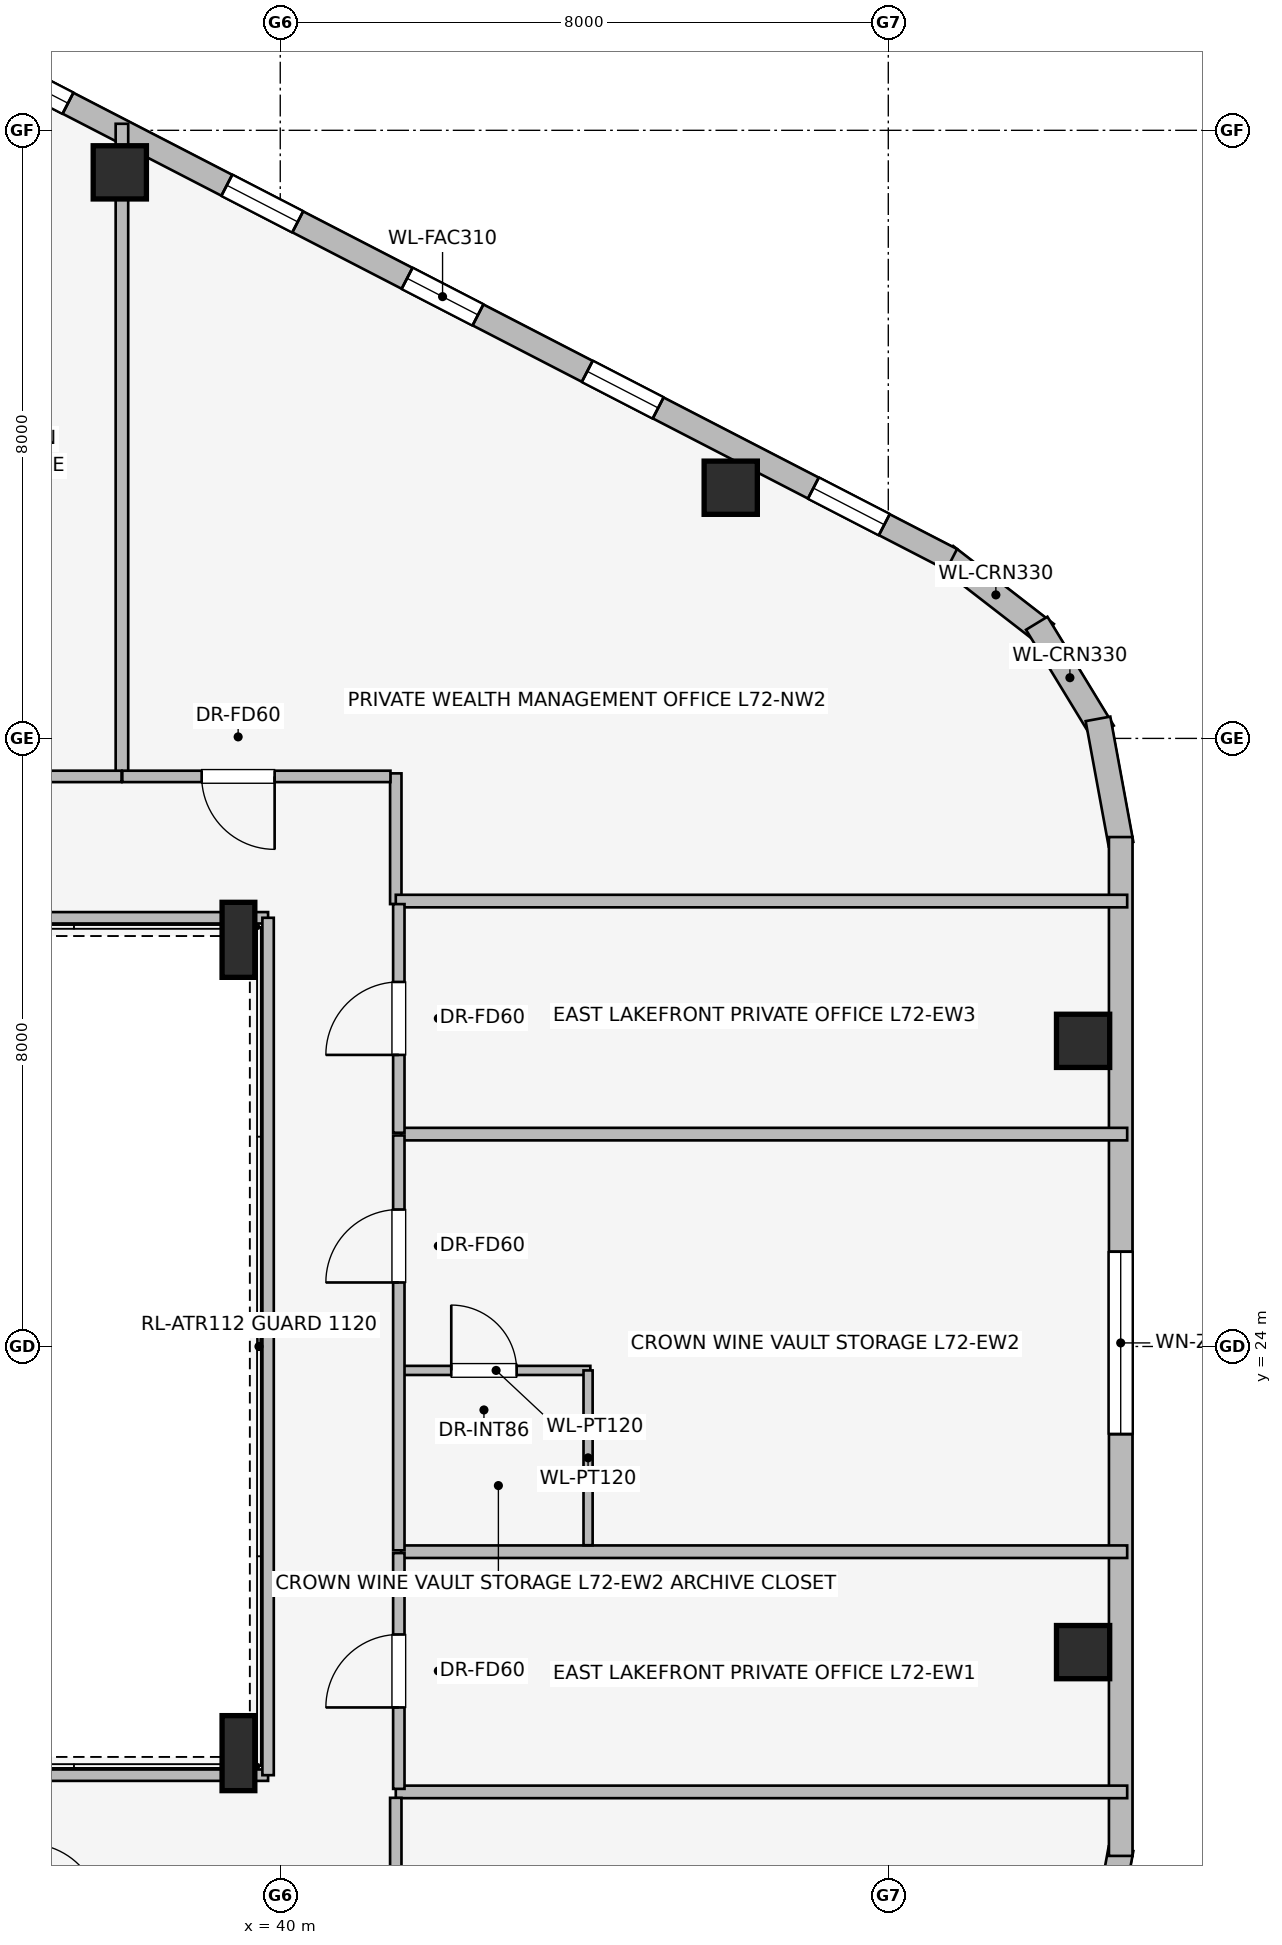
"""IFC4 building model, lengths in metres.
Left out: names, types, materials, properties, quantities, classifications, styles, units other than length and angle.
Written with IfcOpenShell. Run it as: python <this file> out.ifc"""

import sys

from ifc_helpers import new_model, si_unit, direction, frame, frame_2d, origin, origin_2d, place, context, subcontext, project, spatial, rectangle, i_section, extrude, element, fill, save


model = new_model("IFC4")
c1 = context("Model", 3, precision=1e-05, world=origin(), true_north=direction((0.0, 1.0)))
c2 = subcontext(c1, "Body", "Model", "MODEL_VIEW")
j1 = project(units=[si_unit("LENGTHUNIT", "METRE"), si_unit("PLANEANGLEUNIT", "RADIAN")], contexts=[c1])
p1 = place(None, origin())
s1 = spatial("IfcSite", under=j1, at=p1, CompositionType="ELEMENT")
p2 = place(p1, origin())
s2 = spatial("IfcBuilding", under=s1, at=p2, CompositionType="ELEMENT")
p3 = place(p2, frame((0.0, 0.0, 263.2)))
s3 = spatial("IfcBuildingStorey", under=s2, at=p3, CompositionType="ELEMENT", Elevation=263.2)
for number, where, z_axis, x_axis in (
    (1, (45.927, 35.298, 0.0), (0.0, 0.0, 1.0), (1.0, 0.0, 0.0)),
    (2, (37.889, 39.447, 0.0), (0.0, 0.0, 1.0), (1.0, 0.0, 0.0)),
    (3, (50.563, 19.979, 0.0), (0.0, 0.0, 1.0), (1.0, 0.0, 0.0)),
    (4, (50.563, 28.021, 0.0), (0.0, 0.0, 1.0), (1.0, 0.0, 0.0)),
):
    element("IfcColumn", number, at=place(p3, frame(where, z_axis=z_axis, x_axis=x_axis)), inside=s3, PredefinedType="COLUMN", context=c2, shape_type="SweptSolid", body=[
        extrude(rectangle(XDim=0.7, YDim=0.7, at=origin_2d()), origin(), (0.0, 0.0, 1.0), 3.55),
    ])
for number, where, z_axis, x_axis in (
    (5, (39.45, 18.65, 0.0), (0.0, 0.0, 1.0), (1.0, 0.0, 0.0)),
    (6, (39.45, 29.35, 0.0), (0.0, 0.0, 1.0), (1.0, 0.0, 0.0)),
):
    element("IfcColumn", number, at=place(p3, frame(where, z_axis=z_axis, x_axis=x_axis)), inside=s3, PredefinedType="COLUMN", context=c2, shape_type="SweptSolid", body=[
        extrude(i_section(OverallWidth=0.431, OverallDepth=0.987, WebThickness=0.034, FlangeThickness=0.062, at=origin_2d()), origin(), (0.0, 0.0, 1.0), 3.55),
    ])
p4 = place(p3, frame((48.753, 34.401, 0.0), z_axis=(0.0, 0.0, 1.0), x_axis=(0.790691856293, -0.61221433207, 0.0)))
e7 = element("IfcWall", 7, at=p4, inside=s3, PredefinedType="STANDARD", context=c2, shape_type="SweptSolid", body=[
    extrude(rectangle(XDim=1.676, YDim=0.33, at=frame_2d((0.838, 0.0))), origin(), (0.0, 0.0, 1.0), 3.29),
])
p5 = place(p3, frame((49.953, 33.515, 0.0), z_axis=(0.0, 0.0, 1.0), x_axis=(0.520325409202, -0.853968072318, 0.0)))
e8 = element("IfcWall", 8, at=p5, inside=s3, PredefinedType="STANDARD", context=c2, shape_type="SweptSolid", body=[
    extrude(rectangle(XDim=1.678, YDim=0.33, at=frame_2d((0.839, 0.0))), origin(), (0.0, 0.0, 1.0), 3.29),
])
p6 = place(p3, frame((50.759, 32.257, 0.0), z_axis=(0.0, 0.0, 1.0), x_axis=(0.180691763044, -0.983539773862, 0.0)))
e9 = element("IfcWall", 9, at=p6, inside=s3, PredefinedType="STANDARD", context=c2, shape_type="SweptSolid", body=[
    extrude(rectangle(XDim=1.677, YDim=0.33, at=frame_2d((0.838, 0.0))), origin(), (0.0, 0.0, 1.0), 3.29),
])
p7 = place(p3, frame((35.437, 41.27, 0.0), z_axis=(0.0, 0.0, 1.0), x_axis=(0.888581481622, -0.458718814218, 0.0)))
e10 = element("IfcWall", 10, at=p7, inside=s3, PredefinedType="STANDARD", context=c2, shape_type="SweptSolid", body=[
    extrude(rectangle(XDim=15.077, YDim=0.31, at=frame_2d((7.539, 0.0))), origin(), (0.0, 0.0, 1.0), 3.29),
])
p8 = place(p7, frame((0.942, 0.0, 0.75)))
e11 = element("IfcOpeningElement", 11, at=p8, cuts=e10, PredefinedType="OPENING", context=c2, shape_type="SweptSolid", body=[
    extrude(rectangle(XDim=1.05, YDim=1.4, at=frame_2d((0.525, 0.7))), frame((0.0, 0.165, 0.0), z_axis=(0.0, -1.0, 0.0), x_axis=(1.0, 0.0, 0.0)), (0.0, 0.0, 1.0), 0.33),
])
p9 = place(p7, frame((4.344, 0.0, 0.75)))
e12 = element("IfcOpeningElement", 12, at=p9, cuts=e10, PredefinedType="OPENING", context=c2, shape_type="SweptSolid", body=[
    extrude(rectangle(XDim=1.05, YDim=1.4, at=frame_2d((0.525, 0.7))), frame((0.0, 0.165, 0.0), z_axis=(0.0, -1.0, 0.0), x_axis=(1.0, 0.0, 0.0)), (0.0, 0.0, 1.0), 0.33),
])
p10 = place(p7, frame((7.013, 0.0, 0.75)))
e13 = element("IfcOpeningElement", 13, at=p10, cuts=e10, PredefinedType="OPENING", context=c2, shape_type="SweptSolid", body=[
    extrude(rectangle(XDim=1.05, YDim=1.4, at=frame_2d((0.525, 0.7))), frame((0.0, 0.165, 0.0), z_axis=(0.0, -1.0, 0.0), x_axis=(1.0, 0.0, 0.0)), (0.0, 0.0, 1.0), 0.33),
])
p11 = place(p7, frame((9.681, 0.0, 0.75)))
e14 = element("IfcOpeningElement", 14, at=p11, cuts=e10, PredefinedType="OPENING", context=c2, shape_type="SweptSolid", body=[
    extrude(rectangle(XDim=1.05, YDim=1.4, at=frame_2d((0.525, 0.7))), frame((0.0, 0.165, 0.0), z_axis=(0.0, -1.0, 0.0), x_axis=(1.0, 0.0, 0.0)), (0.0, 0.0, 1.0), 0.33),
])
p12 = place(p7, frame((13.029, 0.0, 0.75)))
e15 = element("IfcOpeningElement", 15, at=p12, cuts=e10, PredefinedType="OPENING", context=c2, shape_type="SweptSolid", body=[
    extrude(rectangle(XDim=1.05, YDim=1.4, at=frame_2d((0.525, 0.7))), frame((0.0, 0.165, 0.0), z_axis=(0.0, -1.0, 0.0), x_axis=(1.0, 0.0, 0.0)), (0.0, 0.0, 1.0), 0.33),
])
p13 = place(p3, frame((51.062, 17.392, 0.0), z_axis=(0.0, 0.0, 1.0), x_axis=(-0.180691763044, -0.983539773862, 0.0)))
e16 = element("IfcWall", 16, at=p13, inside=s3, PredefinedType="STANDARD", context=c2, shape_type="SweptSolid", body=[
    extrude(rectangle(XDim=1.677, YDim=0.33, at=frame_2d((0.838, 0.0))), origin(), (0.0, 0.0, 1.0), 3.29),
])
p14 = place(p3, frame((51.058, 30.702, 0.0), z_axis=(0.0, 0.0, 1.0), x_axis=(0.0, -1.0, 0.0)))
e17 = element("IfcWall", 17, at=p14, inside=s3, PredefinedType="STANDARD", context=c2, shape_type="SweptSolid", body=[
    extrude(rectangle(XDim=13.404, YDim=0.31, at=frame_2d((6.702, 0.0))), origin(), (0.0, 0.0, 1.0), 3.29),
])
p15 = place(p14, frame((5.455, 0.0, 0.75)))
e18 = element("IfcOpeningElement", 18, at=p15, cuts=e17, PredefinedType="OPENING", context=c2, shape_type="SweptSolid", body=[
    extrude(rectangle(XDim=2.4, YDim=1.6, at=frame_2d((1.2, 0.8))), frame((0.0, 0.165, 0.0), z_axis=(0.0, -1.0, 0.0), x_axis=(1.0, 0.0, 0.0)), (0.0, 0.0, 1.0), 0.33),
])
p16 = place(p3, frame((27.675, 18.36, 0.0), z_axis=(0.0, 0.0, 1.0), x_axis=(1.0, 0.0, 0.0)))
e19 = element("IfcWall", 19, at=p16, inside=s3, PredefinedType="PARTITIONING", context=c2, shape_type="SweptSolid", body=[
    extrude(rectangle(XDim=12.165, YDim=0.15, at=frame_2d((6.083, 0.0))), origin(), (0.0, 0.0, 1.0), 2.431),
])
p17 = place(p3, frame((39.84, 29.64, 0.0), z_axis=(0.0, 0.0, 1.0), x_axis=(-1.0, 0.0, 0.0)))
e20 = element("IfcWall", 20, at=p17, inside=s3, PredefinedType="PARTITIONING", context=c2, shape_type="SweptSolid", body=[
    extrude(rectangle(XDim=12.203, YDim=0.15, at=frame_2d((6.102, 0.0))), origin(), (0.0, 0.0, 1.0), 2.431),
])
p18 = place(p3, frame((39.84, 18.36, 0.0), z_axis=(0.0, 0.0, 1.0), x_axis=(0.0, 1.0, 0.0)))
e21 = element("IfcWall", 21, at=p18, inside=s3, PredefinedType="PARTITIONING", context=c2, shape_type="SweptSolid", body=[
    extrude(rectangle(XDim=11.28, YDim=0.15, at=frame_2d((5.64, 0.0))), origin(), (0.0, 0.0, 1.0), 3.29),
])
p19 = place(p3, frame((41.52, 29.82, 0.0), z_axis=(0.0, 0.0, 1.0), x_axis=(0.0, 1.0, 0.0)))
e22 = element("IfcWall", 22, at=p19, inside=s3, PredefinedType="PARTITIONING", context=c2, shape_type="SweptSolid", body=[
    extrude(rectangle(XDim=1.72, YDim=0.15, at=frame_2d((0.86, 0.0))), origin(), (0.0, 0.0, 1.0), 3.29),
])
p20 = place(p3, frame((37.917, 31.51, 0.0), z_axis=(0.0, 0.0, 1.0), x_axis=(0.0, 1.0, 0.0)))
e23 = element("IfcWall", 23, at=p20, inside=s3, PredefinedType="PARTITIONING", context=c2, shape_type="SweptSolid", body=[
    extrude(rectangle(XDim=8.576, YDim=0.165, at=frame_2d((4.288, 0.0))), origin(), (0.0, 0.0, 1.0), 2.679),
])
p21 = place(p3, frame((37.912, 31.5, 0.0), z_axis=(0.0, 0.0, 1.0), x_axis=(-1.0, 0.0, 0.0)))
e24 = element("IfcWall", 24, at=p21, inside=s3, PredefinedType="PARTITIONING", context=c2, shape_type="SweptSolid", body=[
    extrude(rectangle(XDim=3.622, YDim=0.15, at=frame_2d((1.811, 0.0))), origin(), (0.0, 0.0, 1.0), 3.29),
])
p22 = place(p21, frame((1.212, 0.0, 0.0)))
e25 = element("IfcOpeningElement", 25, at=p22, cuts=e24, PredefinedType="OPENING", context=c2, shape_type="SweptSolid", body=[
    extrude(rectangle(XDim=0.96, YDim=2.0, at=frame_2d((0.48, 1.0))), frame((0.0, 0.085, 0.0), z_axis=(0.0, -1.0, 0.0), x_axis=(1.0, 0.0, 0.0)), (0.0, 0.0, 1.0), 0.17),
])
p23 = place(p3, frame((41.45, 31.5, 0.0), z_axis=(0.0, 0.0, 1.0), x_axis=(-1.0, 0.0, 0.0)))
e26 = element("IfcWall", 26, at=p23, inside=s3, PredefinedType="PARTITIONING", context=c2, shape_type="SweptSolid", body=[
    extrude(rectangle(XDim=3.528, YDim=0.15, at=frame_2d((1.764, 0.0))), origin(), (0.0, 0.0, 1.0), 3.29),
])
p24 = place(p23, frame((1.524, 0.0, 0.0)))
e27 = element("IfcOpeningElement", 27, at=p24, cuts=e26, PredefinedType="OPENING", context=c2, shape_type="SweptSolid", body=[
    extrude(rectangle(XDim=0.96, YDim=2.0, at=frame_2d((0.48, 1.0))), frame((0.0, 0.085, 0.0), z_axis=(0.0, -1.0, 0.0), x_axis=(1.0, 0.0, 0.0)), (0.0, 0.0, 1.0), 0.17),
])
for number, where, z_axis, x_axis in (
    (28, (41.52, 18.14, 0.0), (0.0, 0.0, 1.0), (1.0, 0.0, 0.0)),
    (29, (41.52, 29.86, 0.0), (0.0, 0.0, 1.0), (1.0, 0.0, 0.0)),
):
    element("IfcWall", number, at=place(p3, frame(where, z_axis=z_axis, x_axis=x_axis)), inside=s3, PredefinedType="PARTITIONING", context=c2, shape_type="SweptSolid", body=[
        extrude(rectangle(XDim=9.623, YDim=0.165, at=frame_2d((4.812, 0.0))), origin(), (0.0, 0.0, 1.0), 3.29),
    ])
for number, where, z_axis, x_axis in (
    (30, (41.59, 21.3, 0.0), (0.0, 0.0, 1.0), (1.0, 0.0, 0.0)),
    (31, (41.59, 26.794, 0.0), (0.0, 0.0, 1.0), (1.0, 0.0, 0.0)),
):
    element("IfcWall", number, at=place(p3, frame(where, z_axis=z_axis, x_axis=x_axis)), inside=s3, PredefinedType="PARTITIONING", context=c2, shape_type="SweptSolid", body=[
        extrude(rectangle(XDim=9.553, YDim=0.165, at=frame_2d((4.776, 0.0))), origin(), (0.0, 0.0, 1.0), 3.29),
    ])
p25 = place(p3, frame((41.56, 18.18, 0.0), z_axis=(0.0, 0.0, 1.0), x_axis=(0.0, 1.0, 0.0)))
e32 = element("IfcWall", 32, at=p25, inside=s3, PredefinedType="PARTITIONING", context=c2, shape_type="SweptSolid", body=[
    extrude(rectangle(XDim=3.102, YDim=0.15, at=frame_2d((1.551, 0.0))), origin(), (0.0, 0.0, 1.0), 3.29),
])
p26 = place(p25, frame((1.071, 0.0, 0.0)))
e33 = element("IfcOpeningElement", 33, at=p26, cuts=e32, PredefinedType="OPENING", context=c2, shape_type="SweptSolid", body=[
    extrude(rectangle(XDim=0.96, YDim=2.0, at=frame_2d((0.48, 1.0))), frame((0.0, 0.085, 0.0), z_axis=(0.0, -1.0, 0.0), x_axis=(1.0, 0.0, 0.0)), (0.0, 0.0, 1.0), 0.17),
])
p27 = place(p3, frame((41.6, 23.685, 0.0), z_axis=(0.0, 0.0, 1.0), x_axis=(1.0, 0.0, 0.0)))
e34 = element("IfcWall", 34, at=p27, inside=s3, PredefinedType="PARTITIONING", context=c2, shape_type="SweptSolid", body=[
    extrude(rectangle(XDim=2.48, YDim=0.12, at=frame_2d((1.24, 0.0))), origin(), (0.0, 0.0, 1.0), 3.29),
])
p28 = place(p27, frame((0.65, 0.0, 0.0)))
e35 = element("IfcOpeningElement", 35, at=p28, cuts=e34, PredefinedType="OPENING", context=c2, shape_type="SweptSolid", body=[
    extrude(rectangle(XDim=0.86, YDim=2.0, at=frame_2d((0.43, 1.0))), frame((0.0, 0.07, 0.0), z_axis=(0.0, -1.0, 0.0), x_axis=(1.0, 0.0, 0.0)), (0.0, 0.0, 1.0), 0.14),
])
p29 = place(p3, frame((44.05, 21.385, 0.0), z_axis=(0.0, 0.0, 1.0), x_axis=(0.0, 1.0, 0.0)))
e36 = element("IfcWall", 36, at=p29, inside=s3, PredefinedType="PARTITIONING", context=c2, shape_type="SweptSolid", body=[
    extrude(rectangle(XDim=2.3, YDim=0.12, at=frame_2d((1.15, 0.0))), origin(), (0.0, 0.0, 1.0), 2.887),
])
p30 = place(p3, frame((41.56, 21.318, 0.0), z_axis=(0.0, 0.0, 1.0), x_axis=(0.0, 1.0, 0.0)))
e37 = element("IfcWall", 37, at=p30, inside=s3, PredefinedType="PARTITIONING", context=c2, shape_type="SweptSolid", body=[
    extrude(rectangle(XDim=5.458, YDim=0.15, at=frame_2d((2.729, 0.0))), origin(), (0.0, 0.0, 1.0), 3.29),
])
p31 = place(p30, frame((3.524, 0.0, 0.0)))
e38 = element("IfcOpeningElement", 38, at=p31, cuts=e37, PredefinedType="OPENING", context=c2, shape_type="SweptSolid", body=[
    extrude(rectangle(XDim=0.96, YDim=2.0, at=frame_2d((0.48, 1.0))), frame((0.0, 0.085, 0.0), z_axis=(0.0, -1.0, 0.0), x_axis=(1.0, 0.0, 0.0)), (0.0, 0.0, 1.0), 0.17),
])
p32 = place(p3, frame((41.56, 26.812, 0.0), z_axis=(0.0, 0.0, 1.0), x_axis=(0.0, 1.0, 0.0)))
e39 = element("IfcWall", 39, at=p32, inside=s3, PredefinedType="PARTITIONING", context=c2, shape_type="SweptSolid", body=[
    extrude(rectangle(XDim=3.008, YDim=0.15, at=frame_2d((1.504, 0.0))), origin(), (0.0, 0.0, 1.0), 3.29),
])
p33 = place(p32, frame((1.024, 0.0, 0.0)))
e40 = element("IfcOpeningElement", 40, at=p33, cuts=e39, PredefinedType="OPENING", context=c2, shape_type="SweptSolid", body=[
    extrude(rectangle(XDim=0.96, YDim=2.0, at=frame_2d((0.48, 1.0))), frame((0.0, 0.085, 0.0), z_axis=(0.0, -1.0, 0.0), x_axis=(1.0, 0.0, 0.0)), (0.0, 0.0, 1.0), 0.17),
])
p34 = place(p3, frame((41.52, 16.46, 0.0), z_axis=(0.0, 0.0, 1.0), x_axis=(0.0, 1.0, 0.0)))
e41 = element("IfcWall", 41, at=p34, inside=s3, PredefinedType="PARTITIONING", context=c2, shape_type="SweptSolid", body=[
    extrude(rectangle(XDim=1.602, YDim=0.15, at=frame_2d((0.801, 0.0))), origin(), (0.0, 0.0, 1.0), 3.29),
])
p35 = place(p8, origin())
e42 = element("IfcWindow", 42, at=p35, inside=s3, PartitioningType="SINGLE_PANEL", PredefinedType="WINDOW", context=c2, shape_type="SweptSolid", body=[
    extrude(rectangle(XDim=1.05, YDim=1.4, at=frame_2d((0.525, 0.7))), frame((0.0, 0.03, 0.0), z_axis=(0.0, -1.0, 0.0), x_axis=(1.0, 0.0, 0.0)), (0.0, 0.0, 1.0), 0.06),
])
fill(e11, e42)
p36 = place(p9, origin())
e43 = element("IfcWindow", 43, at=p36, inside=s3, PartitioningType="SINGLE_PANEL", PredefinedType="WINDOW", context=c2, shape_type="SweptSolid", body=[
    extrude(rectangle(XDim=1.05, YDim=1.4, at=frame_2d((0.525, 0.7))), frame((0.0, 0.03, 0.0), z_axis=(0.0, -1.0, 0.0), x_axis=(1.0, 0.0, 0.0)), (0.0, 0.0, 1.0), 0.06),
])
fill(e12, e43)
p37 = place(p10, origin())
e44 = element("IfcWindow", 44, at=p37, inside=s3, PartitioningType="SINGLE_PANEL", PredefinedType="WINDOW", context=c2, shape_type="SweptSolid", body=[
    extrude(rectangle(XDim=1.05, YDim=1.4, at=frame_2d((0.525, 0.7))), frame((0.0, 0.03, 0.0), z_axis=(0.0, -1.0, 0.0), x_axis=(1.0, 0.0, 0.0)), (0.0, 0.0, 1.0), 0.06),
])
fill(e13, e44)
p38 = place(p11, origin())
e45 = element("IfcWindow", 45, at=p38, inside=s3, PartitioningType="SINGLE_PANEL", PredefinedType="WINDOW", context=c2, shape_type="SweptSolid", body=[
    extrude(rectangle(XDim=1.05, YDim=1.4, at=frame_2d((0.525, 0.7))), frame((0.0, 0.03, 0.0), z_axis=(0.0, -1.0, 0.0), x_axis=(1.0, 0.0, 0.0)), (0.0, 0.0, 1.0), 0.06),
])
fill(e14, e45)
p39 = place(p12, origin())
e46 = element("IfcWindow", 46, at=p39, inside=s3, PartitioningType="SINGLE_PANEL", PredefinedType="WINDOW", context=c2, shape_type="SweptSolid", body=[
    extrude(rectangle(XDim=1.05, YDim=1.4, at=frame_2d((0.525, 0.7))), frame((0.0, 0.03, 0.0), z_axis=(0.0, -1.0, 0.0), x_axis=(1.0, 0.0, 0.0)), (0.0, 0.0, 1.0), 0.06),
])
fill(e15, e46)
p40 = place(p15, origin())
e47 = element("IfcWindow", 47, at=p40, inside=s3, PartitioningType="SINGLE_PANEL", PredefinedType="WINDOW", context=c2, shape_type="SweptSolid", body=[
    extrude(rectangle(XDim=2.4, YDim=1.6, at=frame_2d((1.2, 0.8))), frame((0.0, 0.03, 0.0), z_axis=(0.0, -1.0, 0.0), x_axis=(1.0, 0.0, 0.0)), (0.0, 0.0, 1.0), 0.06),
])
fill(e18, e47)
p41 = place(p24, origin())
e48 = element("IfcDoor", 48, at=p41, inside=s3, OperationType="SINGLE_SWING_LEFT", PredefinedType="DOOR", context=c2, shape_type="SweptSolid", body=[
    extrude(rectangle(XDim=0.96, YDim=2.0, at=frame_2d((0.48, 1.0))), frame((0.0, 0.025, 0.0), z_axis=(0.0, -1.0, 0.0), x_axis=(1.0, 0.0, 0.0)), (0.0, 0.0, 1.0), 0.05),
])
fill(e27, e48)
p42 = place(p26, origin())
e49 = element("IfcDoor", 49, at=p42, inside=s3, OperationType="SINGLE_SWING_LEFT", PredefinedType="DOOR", context=c2, shape_type="SweptSolid", body=[
    extrude(rectangle(XDim=0.96, YDim=2.0, at=frame_2d((0.48, 1.0))), frame((0.0, 0.025, 0.0), z_axis=(0.0, -1.0, 0.0), x_axis=(1.0, 0.0, 0.0)), (0.0, 0.0, 1.0), 0.05),
])
fill(e33, e49)
p43 = place(p28, origin())
e50 = element("IfcDoor", 50, at=p43, inside=s3, OperationType="SINGLE_SWING_LEFT", PredefinedType="DOOR", context=c2, shape_type="SweptSolid", body=[
    extrude(rectangle(XDim=0.86, YDim=2.0, at=frame_2d((0.43, 1.0))), frame((0.0, 0.025, 0.0), z_axis=(0.0, -1.0, 0.0), x_axis=(1.0, 0.0, 0.0)), (0.0, 0.0, 1.0), 0.05),
])
fill(e35, e50)
p44 = place(p31, origin())
e51 = element("IfcDoor", 51, at=p44, inside=s3, OperationType="SINGLE_SWING_LEFT", PredefinedType="DOOR", context=c2, shape_type="SweptSolid", body=[
    extrude(rectangle(XDim=0.96, YDim=2.0, at=frame_2d((0.48, 1.0))), frame((0.0, 0.025, 0.0), z_axis=(0.0, -1.0, 0.0), x_axis=(1.0, 0.0, 0.0)), (0.0, 0.0, 1.0), 0.05),
])
fill(e38, e51)
p45 = place(p33, origin())
e52 = element("IfcDoor", 52, at=p45, inside=s3, OperationType="SINGLE_SWING_LEFT", PredefinedType="DOOR", context=c2, shape_type="SweptSolid", body=[
    extrude(rectangle(XDim=0.96, YDim=2.0, at=frame_2d((0.48, 1.0))), frame((0.0, 0.025, 0.0), z_axis=(0.0, -1.0, 0.0), x_axis=(1.0, 0.0, 0.0)), (0.0, 0.0, 1.0), 0.05),
])
fill(e40, e52)
save(model, sys.argv[1])
